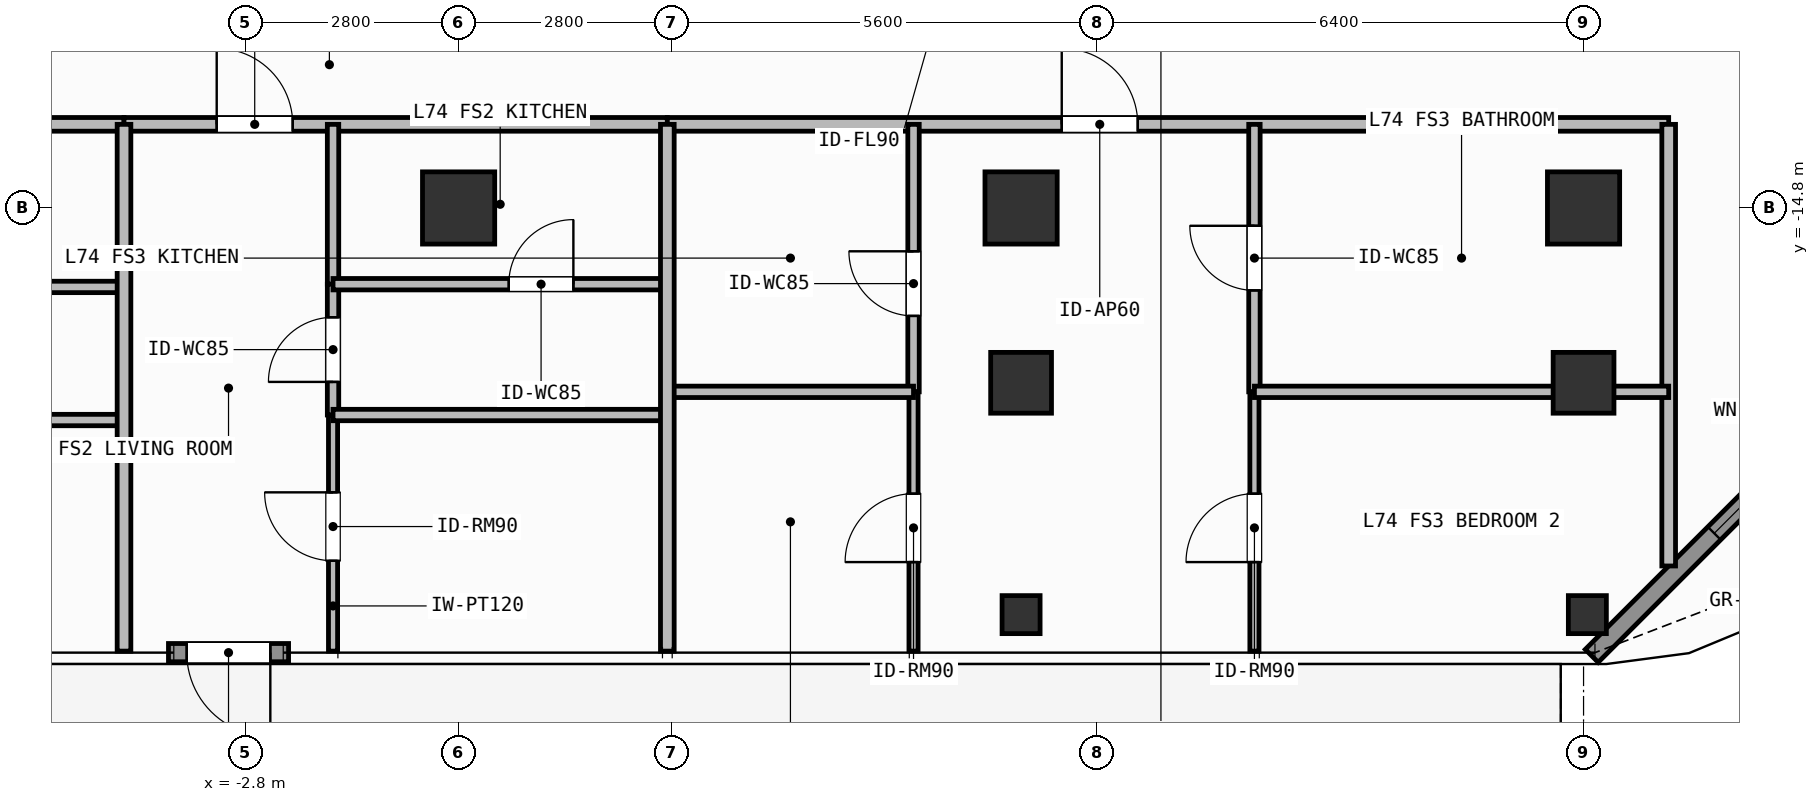
"""IFC4 building model, lengths in metres.
Left out: names, types, materials, properties, quantities, classifications, styles, units other than length and angle.
Written with IfcOpenShell. Run it as: python <this file> out.ifc"""

import sys

from ifc_helpers import new_model, si_unit, direction, frame, frame_2d, origin, origin_2d, place, context, subcontext, project, spatial, rectangle, hollow_rectangle, extrude, element, fill, save


model = new_model("IFC4")
c1 = context("Model", 3, precision=1e-05, world=origin(), true_north=direction((0.0, 1.0)))
c2 = subcontext(c1, "Body", "Model", "MODEL_VIEW")
j1 = project(units=[si_unit("LENGTHUNIT", "METRE"), si_unit("PLANEANGLEUNIT", "RADIAN")], contexts=[c1])
p1 = place(None, origin())
s1 = spatial("IfcSite", under=j1, at=p1, CompositionType="ELEMENT")
p2 = place(p1, origin())
s2 = spatial("IfcBuilding", under=s1, at=p2, CompositionType="ELEMENT")
p3 = place(p2, frame((0.0, 0.0, 301.5)))
s3 = spatial("IfcBuildingStorey", under=s2, at=p3, CompositionType="ELEMENT", Elevation=301.5)
for number, where, z_axis, x_axis in (
    (1, (0.0, -14.8, 0.0), (0.0, 0.0, 1.0), (1.0, 0.0, 0.0)),
    (2, (7.4, -14.8, 0.0), (0.0, 0.0, 1.0), (1.0, 0.0, 0.0)),
    (3, (14.8, -14.8, 0.0), (0.0, 0.0, 1.0), (1.0, 0.0, 0.0)),
):
    element("IfcColumn", number, at=place(p3, frame(where, z_axis=z_axis, x_axis=x_axis)), inside=s3, PredefinedType="COLUMN", context=c2, shape_type="SweptSolid", body=[
        extrude(rectangle(XDim=0.95, YDim=0.95, at=origin_2d()), origin(), (0.0, 0.0, 1.0), 3.9),
    ])
for number, where, z_axis, x_axis in (
    (4, (7.4, -17.1, 0.0), (0.0, 0.0, 1.0), (1.0, 0.0, 0.0)),
    (5, (14.8, -17.1, 0.0), (0.0, 0.0, 1.0), (1.0, 0.0, 0.0)),
):
    element("IfcColumn", number, at=place(p3, frame(where, z_axis=z_axis, x_axis=x_axis)), inside=s3, PredefinedType="COLUMN", context=c2, shape_type="SweptSolid", body=[
        extrude(hollow_rectangle(XDim=0.8, YDim=0.8, WallThickness=0.036, at=origin_2d()), origin(), (0.0, 0.0, 1.0), 3.9),
    ])
for number, where, z_axis, x_axis in (
    (6, (14.85, -20.15, 0.0), (0.0, 0.0, 1.0), (1.0, 0.0, 0.0)),
    (7, (7.4, -20.15, 0.0), (0.0, 0.0, 1.0), (1.0, 0.0, 0.0)),
):
    element("IfcColumn", number, at=place(p3, frame(where, z_axis=z_axis, x_axis=x_axis)), inside=s3, PredefinedType="COLUMN", context=c2, shape_type="SweptSolid", body=[
        extrude(hollow_rectangle(XDim=0.5, YDim=0.5, WallThickness=0.025, at=origin_2d()), origin(), (0.0, 0.0, 1.0), 3.9),
    ])
p4 = place(p3, frame((-2.237, -20.65, 0.0), z_axis=(0.0, 0.0, 1.0), x_axis=(-1.0, 0.0, 0.0)))
e8 = element("IfcWall", 8, at=p4, inside=s3, PredefinedType="SOLIDWALL", context=c2, shape_type="SweptSolid", body=[
    extrude(rectangle(XDim=1.58, YDim=0.24, at=frame_2d((0.79, 0.0))), origin(), (0.0, 0.0, 1.0), 3.68),
])
p5 = place(p4, frame((0.24, 0.0, 0.0)))
e9 = element("IfcOpeningElement", 9, at=p5, cuts=e8, PredefinedType="OPENING", context=c2, shape_type="SweptSolid", body=[
    extrude(rectangle(XDim=1.1, YDim=2.2, at=frame_2d((0.55, 1.1))), frame((0.0, 0.13, 0.0), z_axis=(0.0, -1.0, 0.0), x_axis=(1.0, 0.0, 0.0)), (0.0, 0.0, 1.0), 0.26),
])
p6 = place(p3, frame((19.192, -16.408, 0.0), z_axis=(0.0, 0.0, 1.0), x_axis=(-0.707106781187, -0.707106781187, 0.0)))
e10 = element("IfcWall", 10, at=p6, inside=s3, PredefinedType="SOLIDWALL", context=c2, shape_type="SweptSolid", body=[
    extrude(rectangle(XDim=6.059, YDim=0.24, at=frame_2d((3.03, 0.0))), origin(), (0.0, 0.0, 1.0), 3.68),
])
p7 = place(p6, frame((2.28, 0.0, 0.8)))
e11 = element("IfcOpeningElement", 11, at=p7, cuts=e10, PredefinedType="OPENING", context=c2, shape_type="SweptSolid", body=[
    extrude(rectangle(XDim=1.5, YDim=1.85, at=frame_2d((0.75, 0.925))), frame((0.0, 0.13, 0.0), z_axis=(0.0, -1.0, 0.0), x_axis=(1.0, 0.0, 0.0)), (0.0, 0.0, 1.0), 0.26),
])
p8 = place(p3, frame((-19.32, -13.7, 0.0), z_axis=(0.0, 0.0, 1.0), x_axis=(1.0, 0.0, 0.0)))
e12 = element("IfcWall", 12, at=p8, inside=s3, PredefinedType="PARTITIONING", context=c2, shape_type="SweptSolid", body=[
    extrude(rectangle(XDim=14.918, YDim=0.18, at=frame_2d((7.459, 0.0))), origin(), (0.0, 0.0, 1.0), 3.68),
])
p9 = place(p8, frame((2.486, 0.0, 0.0)))
e13 = element("IfcOpeningElement", 13, at=p9, cuts=e12, PredefinedType="OPENING", context=c2, shape_type="SweptSolid", body=[
    extrude(rectangle(XDim=1.0, YDim=2.2, at=frame_2d((0.5, 1.1))), frame((0.0, 0.1, 0.0), z_axis=(0.0, -1.0, 0.0), x_axis=(1.0, 0.0, 0.0)), (0.0, 0.0, 1.0), 0.2),
])
p10 = place(p3, frame((-4.402, -13.7, 0.0), z_axis=(0.0, 0.0, 1.0), x_axis=(1.0, 0.0, 0.0)))
e14 = element("IfcWall", 14, at=p10, inside=s3, PredefinedType="PARTITIONING", context=c2, shape_type="SweptSolid", body=[
    extrude(rectangle(XDim=7.148, YDim=0.18, at=frame_2d((3.574, 0.0))), origin(), (0.0, 0.0, 1.0), 3.68),
])
p11 = place(p10, frame((1.219, 0.0, 0.0)))
e15 = element("IfcOpeningElement", 15, at=p11, cuts=e14, PredefinedType="OPENING", context=c2, shape_type="SweptSolid", body=[
    extrude(rectangle(XDim=1.0, YDim=2.2, at=frame_2d((0.5, 1.1))), frame((0.0, 0.1, 0.0), z_axis=(0.0, -1.0, 0.0), x_axis=(1.0, 0.0, 0.0)), (0.0, 0.0, 1.0), 0.2),
])
p12 = place(p3, frame((-1.652, -15.803, 0.0), z_axis=(0.0, 0.0, 1.0), x_axis=(0.0, 1.0, 0.0)))
e16 = element("IfcWall", 16, at=p12, inside=s3, PredefinedType="PARTITIONING", context=c2, shape_type="SweptSolid", body=[
    extrude(rectangle(XDim=2.103, YDim=0.15, at=frame_2d((1.052, 0.0))), origin(), (0.0, 0.0, 1.0), 3.68),
])
p13 = place(p3, frame((-1.652, -17.524, 0.0), z_axis=(0.0, 0.0, 1.0), x_axis=(0.0, 1.0, 0.0)))
e17 = element("IfcWall", 17, at=p13, inside=s3, PredefinedType="PARTITIONING", context=c2, shape_type="SweptSolid", body=[
    extrude(rectangle(XDim=1.721, YDim=0.15, at=frame_2d((0.86, 0.0))), origin(), (0.0, 0.0, 1.0), 3.68),
])
p14 = place(p13, frame((0.436, 0.0, 0.0)))
e18 = element("IfcOpeningElement", 18, at=p14, cuts=e17, PredefinedType="OPENING", context=c2, shape_type="SweptSolid", body=[
    extrude(rectangle(XDim=0.85, YDim=2.1, at=frame_2d((0.425, 1.05))), frame((0.0, 0.085, 0.0), z_axis=(0.0, -1.0, 0.0), x_axis=(1.0, 0.0, 0.0)), (0.0, 0.0, 1.0), 0.17),
])
p15 = place(p3, frame((-1.652, -20.63, 0.0), z_axis=(0.0, 0.0, 1.0), x_axis=(0.0, 1.0, 0.0)))
e19 = element("IfcWall", 19, at=p15, inside=s3, PredefinedType="PARTITIONING", context=c2, shape_type="SweptSolid", body=[
    extrude(rectangle(XDim=3.106, YDim=0.12, at=frame_2d((1.553, 0.0))), origin(), (0.0, 0.0, 1.0), 3.68),
])
p16 = place(p15, frame((1.189, 0.0, 0.0)))
e20 = element("IfcOpeningElement", 20, at=p16, cuts=e19, PredefinedType="OPENING", context=c2, shape_type="SweptSolid", body=[
    extrude(rectangle(XDim=0.9, YDim=2.1, at=frame_2d((0.45, 1.05))), frame((0.0, 0.07, 0.0), z_axis=(0.0, -1.0, 0.0), x_axis=(1.0, 0.0, 0.0)), (0.0, 0.0, 1.0), 0.14),
])
p17 = place(p3, frame((2.746, -13.7, 0.0), z_axis=(0.0, 0.0, 1.0), x_axis=(1.0, 0.0, 0.0)))
e21 = element("IfcWall", 21, at=p17, inside=s3, PredefinedType="PARTITIONING", context=c2, shape_type="SweptSolid", body=[
    extrude(rectangle(XDim=13.174, YDim=0.18, at=frame_2d((6.587, 0.0))), origin(), (0.0, 0.0, 1.0), 3.68),
])
p18 = place(p17, frame((5.189, 0.0, 0.0)))
e22 = element("IfcOpeningElement", 22, at=p18, cuts=e21, PredefinedType="OPENING", context=c2, shape_type="SweptSolid", body=[
    extrude(rectangle(XDim=1.0, YDim=2.2, at=frame_2d((0.5, 1.1))), frame((0.0, 0.1, 0.0), z_axis=(0.0, -1.0, 0.0), x_axis=(1.0, 0.0, 0.0)), (0.0, 0.0, 1.0), 0.2),
])
p19 = place(p3, frame((5.985, -17.219, 0.0), z_axis=(0.0, 0.0, 1.0), x_axis=(0.0, 1.0, 0.0)))
e23 = element("IfcWall", 23, at=p19, inside=s3, PredefinedType="PARTITIONING", context=c2, shape_type="SweptSolid", body=[
    extrude(rectangle(XDim=3.519, YDim=0.15, at=frame_2d((1.76, 0.0))), origin(), (0.0, 0.0, 1.0), 3.68),
])
p20 = place(p19, frame((0.999, 0.0, 0.0)))
e24 = element("IfcOpeningElement", 24, at=p20, cuts=e23, PredefinedType="OPENING", context=c2, shape_type="SweptSolid", body=[
    extrude(rectangle(XDim=0.85, YDim=2.1, at=frame_2d((0.425, 1.05))), frame((0.0, 0.085, 0.0), z_axis=(0.0, -1.0, 0.0), x_axis=(1.0, 0.0, 0.0)), (0.0, 0.0, 1.0), 0.17),
])
p21 = place(p3, frame((5.985, -20.63, 0.0), z_axis=(0.0, 0.0, 1.0), x_axis=(0.0, 1.0, 0.0)))
e25 = element("IfcWall", 25, at=p21, inside=s3, PredefinedType="PARTITIONING", context=c2, shape_type="SweptSolid", body=[
    extrude(rectangle(XDim=3.411, YDim=0.12, at=frame_2d((1.706, 0.0))), origin(), (0.0, 0.0, 1.0), 3.68),
])
p22 = place(p21, frame((1.171, 0.0, 0.0)))
e26 = element("IfcOpeningElement", 26, at=p22, cuts=e25, PredefinedType="OPENING", context=c2, shape_type="SweptSolid", body=[
    extrude(rectangle(XDim=0.9, YDim=2.1, at=frame_2d((0.45, 1.05))), frame((0.0, 0.07, 0.0), z_axis=(0.0, -1.0, 0.0), x_axis=(1.0, 0.0, 0.0)), (0.0, 0.0, 1.0), 0.14),
])
p23 = place(p3, frame((10.47, -17.219, 0.0), z_axis=(0.0, 0.0, 1.0), x_axis=(0.0, 1.0, 0.0)))
e27 = element("IfcWall", 27, at=p23, inside=s3, PredefinedType="PARTITIONING", context=c2, shape_type="SweptSolid", body=[
    extrude(rectangle(XDim=3.519, YDim=0.15, at=frame_2d((1.76, 0.0))), origin(), (0.0, 0.0, 1.0), 3.68),
])
p24 = place(p23, frame((1.334, 0.0, 0.0)))
e28 = element("IfcOpeningElement", 28, at=p24, cuts=e27, PredefinedType="OPENING", context=c2, shape_type="SweptSolid", body=[
    extrude(rectangle(XDim=0.85, YDim=2.1, at=frame_2d((0.425, 1.05))), frame((0.0, 0.085, 0.0), z_axis=(0.0, -1.0, 0.0), x_axis=(1.0, 0.0, 0.0)), (0.0, 0.0, 1.0), 0.17),
])
p25 = place(p3, frame((10.47, -20.63, 0.0), z_axis=(0.0, 0.0, 1.0), x_axis=(0.0, 1.0, 0.0)))
e29 = element("IfcWall", 29, at=p25, inside=s3, PredefinedType="PARTITIONING", context=c2, shape_type="SweptSolid", body=[
    extrude(rectangle(XDim=3.411, YDim=0.12, at=frame_2d((1.706, 0.0))), origin(), (0.0, 0.0, 1.0), 3.68),
])
p26 = place(p25, frame((1.171, 0.0, 0.0)))
e30 = element("IfcOpeningElement", 30, at=p26, cuts=e29, PredefinedType="OPENING", context=c2, shape_type="SweptSolid", body=[
    extrude(rectangle(XDim=0.9, YDim=2.1, at=frame_2d((0.45, 1.05))), frame((0.0, 0.07, 0.0), z_axis=(0.0, -1.0, 0.0), x_axis=(1.0, 0.0, 0.0)), (0.0, 0.0, 1.0), 0.14),
])
p27 = place(p3, frame((15.92, -19.51, 0.0), z_axis=(0.0, 0.0, 1.0), x_axis=(0.0, 1.0, 0.0)))
e31 = element("IfcWall", 31, at=p27, inside=s3, PredefinedType="PARTITIONING", context=c2, shape_type="SweptSolid", body=[
    extrude(rectangle(XDim=5.81, YDim=0.18, at=frame_2d((2.905, 0.0))), origin(), (0.0, 0.0, 1.0), 3.68),
])
for number, where, z_axis, x_axis in (
    (32, (-12.159, -15.839, 0.0), (0.0, 0.0, 1.0), (1.0, 0.0, 0.0)),
    (33, (-12.159, -17.59, 0.0), (0.0, 0.0, 1.0), (1.0, 0.0, 0.0)),
):
    element("IfcWall", number, at=place(p3, frame(where, z_axis=z_axis, x_axis=x_axis)), inside=s3, PredefinedType="PARTITIONING", context=c2, shape_type="SweptSolid", body=[
        extrude(rectangle(XDim=7.757, YDim=0.15, at=frame_2d((3.878, 0.0))), origin(), (0.0, 0.0, 1.0), 3.68),
    ])
p28 = place(p3, frame((-1.652, -15.803, 0.0), z_axis=(0.0, 0.0, 1.0), x_axis=(1.0, 0.0, 0.0)))
e34 = element("IfcWall", 34, at=p28, inside=s3, PredefinedType="PARTITIONING", context=c2, shape_type="SweptSolid", body=[
    extrude(rectangle(XDim=4.398, YDim=0.15, at=frame_2d((2.199, 0.0))), origin(), (0.0, 0.0, 1.0), 3.68),
])
p29 = place(p28, frame((2.312, 0.0, 0.0)))
e35 = element("IfcOpeningElement", 35, at=p29, cuts=e34, PredefinedType="OPENING", context=c2, shape_type="SweptSolid", body=[
    extrude(rectangle(XDim=0.85, YDim=2.1, at=frame_2d((0.425, 1.05))), frame((0.0, 0.085, 0.0), z_axis=(0.0, -1.0, 0.0), x_axis=(1.0, 0.0, 0.0)), (0.0, 0.0, 1.0), 0.17),
])
p30 = place(p3, frame((-1.652, -17.524, 0.0), z_axis=(0.0, 0.0, 1.0), x_axis=(1.0, 0.0, 0.0)))
e36 = element("IfcWall", 36, at=p30, inside=s3, PredefinedType="PARTITIONING", context=c2, shape_type="SweptSolid", body=[
    extrude(rectangle(XDim=4.398, YDim=0.15, at=frame_2d((2.199, 0.0))), origin(), (0.0, 0.0, 1.0), 3.68),
])
p31 = place(p3, frame((-4.402, -20.63, 0.0), z_axis=(0.0, 0.0, 1.0), x_axis=(0.0, 1.0, 0.0)))
e37 = element("IfcWall", 37, at=p31, inside=s3, PredefinedType="PARTITIONING", context=c2, shape_type="SweptSolid", body=[
    extrude(rectangle(XDim=6.93, YDim=0.18, at=frame_2d((3.465, 0.0))), origin(), (0.0, 0.0, 1.0), 3.68),
])
p32 = place(p3, frame((2.746, -17.219, 0.0), z_axis=(0.0, 0.0, 1.0), x_axis=(1.0, 0.0, 0.0)))
e38 = element("IfcWall", 38, at=p32, inside=s3, PredefinedType="PARTITIONING", context=c2, shape_type="SweptSolid", body=[
    extrude(rectangle(XDim=3.239, YDim=0.15, at=frame_2d((1.62, 0.0))), origin(), (0.0, 0.0, 1.0), 3.182),
])
p33 = place(p3, frame((10.47, -17.219, 0.0), z_axis=(0.0, 0.0, 1.0), x_axis=(1.0, 0.0, 0.0)))
e39 = element("IfcWall", 39, at=p33, inside=s3, PredefinedType="PARTITIONING", context=c2, shape_type="SweptSolid", body=[
    extrude(rectangle(XDim=5.45, YDim=0.15, at=frame_2d((2.725, 0.0))), origin(), (0.0, 0.0, 1.0), 3.182),
])
p34 = place(p3, frame((2.746, -20.63, 0.0), z_axis=(0.0, 0.0, 1.0), x_axis=(0.0, 1.0, 0.0)))
e40 = element("IfcWall", 40, at=p34, inside=s3, PredefinedType="PARTITIONING", context=c2, shape_type="SweptSolid", body=[
    extrude(rectangle(XDim=6.93, YDim=0.18, at=frame_2d((3.465, 0.0))), origin(), (0.0, 0.0, 1.0), 3.68),
])
p35 = place(p5, origin())
e41 = element("IfcDoor", 41, at=p35, inside=s3, OperationType="SINGLE_SWING_LEFT", PredefinedType="DOOR", context=c2, shape_type="SweptSolid", body=[
    extrude(rectangle(XDim=1.1, YDim=2.2, at=frame_2d((0.55, 1.1))), frame((0.0, 0.025, 0.0), z_axis=(0.0, -1.0, 0.0), x_axis=(1.0, 0.0, 0.0)), (0.0, 0.0, 1.0), 0.05),
])
fill(e9, e41)
p36 = place(p7, origin())
e42 = element("IfcWindow", 42, at=p36, inside=s3, PartitioningType="SINGLE_PANEL", PredefinedType="WINDOW", context=c2, shape_type="SweptSolid", body=[
    extrude(rectangle(XDim=1.5, YDim=1.85, at=frame_2d((0.75, 0.925))), frame((0.0, 0.03, 0.0), z_axis=(0.0, -1.0, 0.0), x_axis=(1.0, 0.0, 0.0)), (0.0, 0.0, 1.0), 0.06),
])
fill(e11, e42)
p37 = place(p11, origin())
e43 = element("IfcDoor", 43, at=p37, inside=s3, OperationType="SINGLE_SWING_LEFT", PredefinedType="DOOR", context=c2, shape_type="SweptSolid", body=[
    extrude(rectangle(XDim=1.0, YDim=2.2, at=frame_2d((0.5, 1.1))), frame((0.0, 0.025, 0.0), z_axis=(0.0, -1.0, 0.0), x_axis=(1.0, 0.0, 0.0)), (0.0, 0.0, 1.0), 0.05),
])
fill(e15, e43)
p38 = place(p29, origin())
e44 = element("IfcDoor", 44, at=p38, inside=s3, OperationType="SINGLE_SWING_RIGHT", PredefinedType="DOOR", context=c2, shape_type="SweptSolid", body=[
    extrude(rectangle(XDim=0.85, YDim=2.1, at=frame_2d((0.425, 1.05))), frame((0.0, 0.025, 0.0), z_axis=(0.0, -1.0, 0.0), x_axis=(1.0, 0.0, 0.0)), (0.0, 0.0, 1.0), 0.05),
])
fill(e35, e44)
p39 = place(p14, origin())
e45 = element("IfcDoor", 45, at=p39, inside=s3, OperationType="SINGLE_SWING_LEFT", PredefinedType="DOOR", context=c2, shape_type="SweptSolid", body=[
    extrude(rectangle(XDim=0.85, YDim=2.1, at=frame_2d((0.425, 1.05))), frame((0.0, 0.025, 0.0), z_axis=(0.0, -1.0, 0.0), x_axis=(1.0, 0.0, 0.0)), (0.0, 0.0, 1.0), 0.05),
])
fill(e18, e45)
p40 = place(p16, origin())
e46 = element("IfcDoor", 46, at=p40, inside=s3, OperationType="SINGLE_SWING_RIGHT", PredefinedType="DOOR", context=c2, shape_type="SweptSolid", body=[
    extrude(rectangle(XDim=0.9, YDim=2.1, at=frame_2d((0.45, 1.05))), frame((0.0, 0.025, 0.0), z_axis=(0.0, -1.0, 0.0), x_axis=(1.0, 0.0, 0.0)), (0.0, 0.0, 1.0), 0.05),
])
fill(e20, e46)
p41 = place(p18, origin())
e47 = element("IfcDoor", 47, at=p41, inside=s3, OperationType="SINGLE_SWING_LEFT", PredefinedType="DOOR", context=c2, shape_type="SweptSolid", body=[
    extrude(rectangle(XDim=1.0, YDim=2.2, at=frame_2d((0.5, 1.1))), frame((0.0, 0.025, 0.0), z_axis=(0.0, -1.0, 0.0), x_axis=(1.0, 0.0, 0.0)), (0.0, 0.0, 1.0), 0.05),
])
fill(e22, e47)
p42 = place(p20, origin())
e48 = element("IfcDoor", 48, at=p42, inside=s3, OperationType="SINGLE_SWING_RIGHT", PredefinedType="DOOR", context=c2, shape_type="SweptSolid", body=[
    extrude(rectangle(XDim=0.85, YDim=2.1, at=frame_2d((0.425, 1.05))), frame((0.0, 0.025, 0.0), z_axis=(0.0, -1.0, 0.0), x_axis=(1.0, 0.0, 0.0)), (0.0, 0.0, 1.0), 0.05),
])
fill(e24, e48)
p43 = place(p22, origin())
e49 = element("IfcDoor", 49, at=p43, inside=s3, OperationType="SINGLE_SWING_LEFT", PredefinedType="DOOR", context=c2, shape_type="SweptSolid", body=[
    extrude(rectangle(XDim=0.9, YDim=2.1, at=frame_2d((0.45, 1.05))), frame((0.0, 0.025, 0.0), z_axis=(0.0, -1.0, 0.0), x_axis=(1.0, 0.0, 0.0)), (0.0, 0.0, 1.0), 0.05),
])
fill(e26, e49)
p44 = place(p24, origin())
e50 = element("IfcDoor", 50, at=p44, inside=s3, OperationType="SINGLE_SWING_RIGHT", PredefinedType="DOOR", context=c2, shape_type="SweptSolid", body=[
    extrude(rectangle(XDim=0.85, YDim=2.1, at=frame_2d((0.425, 1.05))), frame((0.0, 0.025, 0.0), z_axis=(0.0, -1.0, 0.0), x_axis=(1.0, 0.0, 0.0)), (0.0, 0.0, 1.0), 0.05),
])
fill(e28, e50)
p45 = place(p26, origin())
e51 = element("IfcDoor", 51, at=p45, inside=s3, OperationType="SINGLE_SWING_LEFT", PredefinedType="DOOR", context=c2, shape_type="SweptSolid", body=[
    extrude(rectangle(XDim=0.9, YDim=2.1, at=frame_2d((0.45, 1.05))), frame((0.0, 0.025, 0.0), z_axis=(0.0, -1.0, 0.0), x_axis=(1.0, 0.0, 0.0)), (0.0, 0.0, 1.0), 0.05),
])
fill(e30, e51)
save(model, sys.argv[1])
